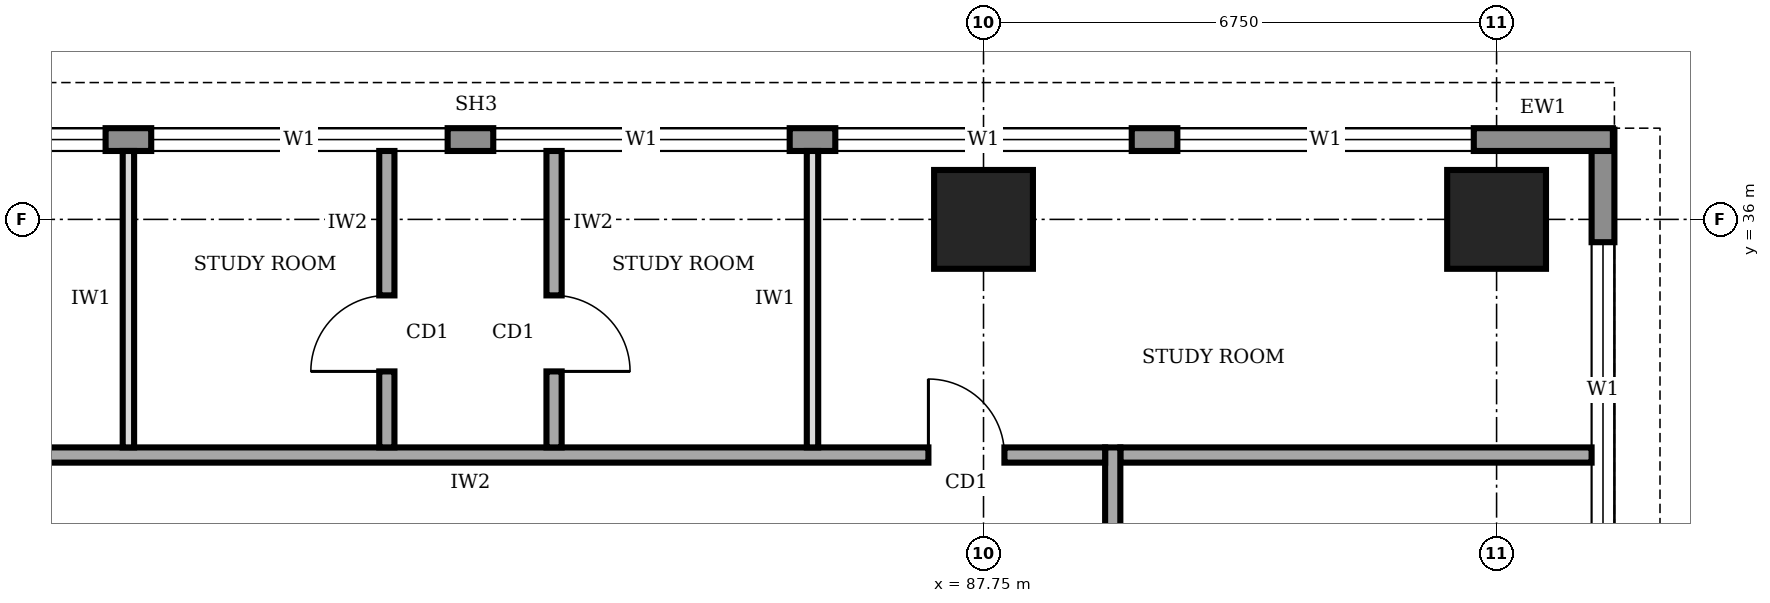
"""IFC4 building model, lengths in metres.
Left out: names, types, materials, properties, quantities, classifications, styles, units other than length and angle.
Written with IfcOpenShell. Run it as: python <this file> out.ifc"""

import sys

from ifc_helpers import new_model, si_unit, direction, frame, frame_2d, origin, origin_2d, place, context, subcontext, project, spatial, rectangle, extrude, element, fill, save


model = new_model("IFC4")
c1 = context("Model", 3, precision=1e-05, world=origin(), true_north=direction((0.0, 1.0)))
c2 = subcontext(c1, "Body", "Model", "MODEL_VIEW")
j1 = project(units=[si_unit("LENGTHUNIT", "METRE"), si_unit("PLANEANGLEUNIT", "RADIAN")], contexts=[c1])
p1 = place(None, origin())
s1 = spatial("IfcSite", under=j1, at=p1, CompositionType="ELEMENT")
p2 = place(p1, origin())
s2 = spatial("IfcBuilding", under=s1, at=p2, CompositionType="ELEMENT")
p3 = place(p2, frame((0.0, 0.0, 225.0)))
s3 = spatial("IfcBuildingStorey", under=s2, at=p3, CompositionType="ELEMENT", Elevation=225.0)
for number, where, z_axis, x_axis in (
    (1, (87.75, 36.0, 0.0), (0.0, 0.0, 1.0), (1.0, 0.0, 0.0)),
    (2, (94.5, 36.0, 0.0), (0.0, 0.0, 1.0), (1.0, 0.0, 0.0)),
):
    element("IfcColumn", number, at=place(p3, frame(where, z_axis=z_axis, x_axis=x_axis)), inside=s3, PredefinedType="COLUMN", context=c2, shape_type="SweptSolid", body=[
        extrude(rectangle(XDim=1.3, YDim=1.3, at=origin_2d()), origin(), (0.0, 0.0, 1.0), 4.0),
    ])
p4 = place(p3, frame((95.9, 3.32, 0.0), z_axis=(0.0, 0.0, 1.0), x_axis=(0.0, 1.0, 0.0)))
e3 = element("IfcWall", 3, at=p4, inside=s3, PredefinedType="STANDARD", context=c2, shape_type="SweptSolid", body=[
    extrude(rectangle(XDim=33.86, YDim=0.3, at=frame_2d((16.93, 0.0))), origin(), (0.0, 0.0, 1.0), 3.75),
])
p5 = place(p4, frame((1.48, 0.0, 0.9)))
e4 = element("IfcOpeningElement", 4, at=p5, cuts=e3, PredefinedType="OPENING", context=c2, shape_type="SweptSolid", body=[
    extrude(rectangle(XDim=3.9, YDim=2.2, at=frame_2d((1.95, 1.1))), frame((0.0, 0.16, 0.0), z_axis=(0.0, -1.0, 0.0), x_axis=(1.0, 0.0, 0.0)), (0.0, 0.0, 1.0), 0.32),
])
p6 = place(p4, frame((5.98, 0.0, 0.9)))
e5 = element("IfcOpeningElement", 5, at=p6, cuts=e3, PredefinedType="OPENING", context=c2, shape_type="SweptSolid", body=[
    extrude(rectangle(XDim=3.9, YDim=2.2, at=frame_2d((1.95, 1.1))), frame((0.0, 0.16, 0.0), z_axis=(0.0, -1.0, 0.0), x_axis=(1.0, 0.0, 0.0)), (0.0, 0.0, 1.0), 0.32),
])
p7 = place(p4, frame((10.48, 0.0, 0.9)))
e6 = element("IfcOpeningElement", 6, at=p7, cuts=e3, PredefinedType="OPENING", context=c2, shape_type="SweptSolid", body=[
    extrude(rectangle(XDim=3.9, YDim=2.2, at=frame_2d((1.95, 1.1))), frame((0.0, 0.16, 0.0), z_axis=(0.0, -1.0, 0.0), x_axis=(1.0, 0.0, 0.0)), (0.0, 0.0, 1.0), 0.32),
])
p8 = place(p4, frame((14.98, 0.0, 0.9)))
e7 = element("IfcOpeningElement", 7, at=p8, cuts=e3, PredefinedType="OPENING", context=c2, shape_type="SweptSolid", body=[
    extrude(rectangle(XDim=3.9, YDim=2.2, at=frame_2d((1.95, 1.1))), frame((0.0, 0.16, 0.0), z_axis=(0.0, -1.0, 0.0), x_axis=(1.0, 0.0, 0.0)), (0.0, 0.0, 1.0), 0.32),
])
p9 = place(p4, frame((19.48, 0.0, 0.9)))
e8 = element("IfcOpeningElement", 8, at=p9, cuts=e3, PredefinedType="OPENING", context=c2, shape_type="SweptSolid", body=[
    extrude(rectangle(XDim=3.9, YDim=2.2, at=frame_2d((1.95, 1.1))), frame((0.0, 0.16, 0.0), z_axis=(0.0, -1.0, 0.0), x_axis=(1.0, 0.0, 0.0)), (0.0, 0.0, 1.0), 0.32),
])
p10 = place(p4, frame((23.98, 0.0, 0.9)))
e9 = element("IfcOpeningElement", 9, at=p10, cuts=e3, PredefinedType="OPENING", context=c2, shape_type="SweptSolid", body=[
    extrude(rectangle(XDim=3.9, YDim=2.2, at=frame_2d((1.95, 1.1))), frame((0.0, 0.16, 0.0), z_axis=(0.0, -1.0, 0.0), x_axis=(1.0, 0.0, 0.0)), (0.0, 0.0, 1.0), 0.32),
])
p11 = place(p4, frame((28.48, 0.0, 0.9)))
e10 = element("IfcOpeningElement", 10, at=p11, cuts=e3, PredefinedType="OPENING", context=c2, shape_type="SweptSolid", body=[
    extrude(rectangle(XDim=3.9, YDim=2.2, at=frame_2d((1.95, 1.1))), frame((0.0, 0.16, 0.0), z_axis=(0.0, -1.0, 0.0), x_axis=(1.0, 0.0, 0.0)), (0.0, 0.0, 1.0), 0.32),
])
p12 = place(p3, frame((96.03, 37.05, 0.0), z_axis=(0.0, 0.0, 1.0), x_axis=(-1.0, 0.0, 0.0)))
e11 = element("IfcWall", 11, at=p12, inside=s3, PredefinedType="STANDARD", context=c2, shape_type="SweptSolid", body=[
    extrude(rectangle(XDim=29.91, YDim=0.3, at=frame_2d((14.955, 0.0))), origin(), (0.0, 0.0, 1.0), 3.75),
])
p13 = place(p12, frame((24.33, 0.0, 0.9)))
e12 = element("IfcOpeningElement", 12, at=p13, cuts=e11, PredefinedType="OPENING", context=c2, shape_type="SweptSolid", body=[
    extrude(rectangle(XDim=3.9, YDim=2.2, at=frame_2d((1.95, 1.1))), frame((0.0, 0.16, 0.0), z_axis=(0.0, -1.0, 0.0), x_axis=(1.0, 0.0, 0.0)), (0.0, 0.0, 1.0), 0.32),
])
p14 = place(p12, frame((19.83, 0.0, 0.9)))
e13 = element("IfcOpeningElement", 13, at=p14, cuts=e11, PredefinedType="OPENING", context=c2, shape_type="SweptSolid", body=[
    extrude(rectangle(XDim=3.9, YDim=2.2, at=frame_2d((1.95, 1.1))), frame((0.0, 0.16, 0.0), z_axis=(0.0, -1.0, 0.0), x_axis=(1.0, 0.0, 0.0)), (0.0, 0.0, 1.0), 0.32),
])
p15 = place(p12, frame((15.33, 0.0, 0.9)))
e14 = element("IfcOpeningElement", 14, at=p15, cuts=e11, PredefinedType="OPENING", context=c2, shape_type="SweptSolid", body=[
    extrude(rectangle(XDim=3.9, YDim=2.2, at=frame_2d((1.95, 1.1))), frame((0.0, 0.16, 0.0), z_axis=(0.0, -1.0, 0.0), x_axis=(1.0, 0.0, 0.0)), (0.0, 0.0, 1.0), 0.32),
])
p16 = place(p12, frame((10.83, 0.0, 0.9)))
e15 = element("IfcOpeningElement", 15, at=p16, cuts=e11, PredefinedType="OPENING", context=c2, shape_type="SweptSolid", body=[
    extrude(rectangle(XDim=3.9, YDim=2.2, at=frame_2d((1.95, 1.1))), frame((0.0, 0.16, 0.0), z_axis=(0.0, -1.0, 0.0), x_axis=(1.0, 0.0, 0.0)), (0.0, 0.0, 1.0), 0.32),
])
p17 = place(p12, frame((6.33, 0.0, 0.9)))
e16 = element("IfcOpeningElement", 16, at=p17, cuts=e11, PredefinedType="OPENING", context=c2, shape_type="SweptSolid", body=[
    extrude(rectangle(XDim=3.9, YDim=2.2, at=frame_2d((1.95, 1.1))), frame((0.0, 0.16, 0.0), z_axis=(0.0, -1.0, 0.0), x_axis=(1.0, 0.0, 0.0)), (0.0, 0.0, 1.0), 0.32),
])
p18 = place(p12, frame((1.83, 0.0, 0.9)))
e17 = element("IfcOpeningElement", 17, at=p18, cuts=e11, PredefinedType="OPENING", context=c2, shape_type="SweptSolid", body=[
    extrude(rectangle(XDim=3.9, YDim=2.2, at=frame_2d((1.95, 1.1))), frame((0.0, 0.16, 0.0), z_axis=(0.0, -1.0, 0.0), x_axis=(1.0, 0.0, 0.0)), (0.0, 0.0, 1.0), 0.32),
])
p19 = place(p3, frame((89.45, 9.2, 0.0), z_axis=(0.0, 0.0, 1.0), x_axis=(0.0, 1.0, 0.0)))
e18 = element("IfcWall", 18, at=p19, inside=s3, PredefinedType="SOLIDWALL", context=c2, shape_type="SweptSolid", body=[
    extrude(rectangle(XDim=23.8, YDim=0.2, at=frame_2d((11.9, 0.0))), origin(), (0.0, 0.0, 1.0), 3.75),
])
p20 = place(p19, frame((1.55, 0.0, 0.0)))
e19 = element("IfcOpeningElement", 19, at=p20, cuts=e18, PredefinedType="OPENING", context=c2, shape_type="SweptSolid", body=[
    extrude(rectangle(XDim=1.0, YDim=2.1, at=frame_2d((0.5, 1.05))), frame((0.0, 0.11, 0.0), z_axis=(0.0, -1.0, 0.0), x_axis=(1.0, 0.0, 0.0)), (0.0, 0.0, 1.0), 0.22),
])
p21 = place(p19, frame((5.75, 0.0, 0.0)))
e20 = element("IfcOpeningElement", 20, at=p21, cuts=e18, PredefinedType="OPENING", context=c2, shape_type="SweptSolid", body=[
    extrude(rectangle(XDim=0.9, YDim=2.1, at=frame_2d((0.45, 1.05))), frame((0.0, 0.11, 0.0), z_axis=(0.0, -1.0, 0.0), x_axis=(1.0, 0.0, 0.0)), (0.0, 0.0, 1.0), 0.22),
])
p22 = place(p19, frame((8.75, 0.0, 0.0)))
e21 = element("IfcOpeningElement", 21, at=p22, cuts=e18, PredefinedType="OPENING", context=c2, shape_type="SweptSolid", body=[
    extrude(rectangle(XDim=0.9, YDim=2.1, at=frame_2d((0.45, 1.05))), frame((0.0, 0.11, 0.0), z_axis=(0.0, -1.0, 0.0), x_axis=(1.0, 0.0, 0.0)), (0.0, 0.0, 1.0), 0.22),
])
p23 = place(p19, frame((13.6, 0.0, 0.0)))
e22 = element("IfcOpeningElement", 22, at=p23, cuts=e18, PredefinedType="OPENING", context=c2, shape_type="SweptSolid", body=[
    extrude(rectangle(XDim=0.9, YDim=2.1, at=frame_2d((0.45, 1.05))), frame((0.0, 0.11, 0.0), z_axis=(0.0, -1.0, 0.0), x_axis=(1.0, 0.0, 0.0)), (0.0, 0.0, 1.0), 0.22),
])
p24 = place(p19, frame((16.3, 0.0, 0.0)))
e23 = element("IfcOpeningElement", 23, at=p24, cuts=e18, PredefinedType="OPENING", context=c2, shape_type="SweptSolid", body=[
    extrude(rectangle(XDim=1.0, YDim=2.1, at=frame_2d((0.5, 1.05))), frame((0.0, 0.11, 0.0), z_axis=(0.0, -1.0, 0.0), x_axis=(1.0, 0.0, 0.0)), (0.0, 0.0, 1.0), 0.22),
])
p25 = place(p19, frame((10.8, 0.0, 0.0)))
e24 = element("IfcOpeningElement", 24, at=p25, cuts=e18, PredefinedType="OPENING", context=c2, shape_type="SweptSolid", body=[
    extrude(rectangle(XDim=1.0, YDim=2.1, at=frame_2d((0.5, 1.05))), frame((0.0, 0.11, 0.0), z_axis=(0.0, -1.0, 0.0), x_axis=(1.0, 0.0, 0.0)), (0.0, 0.0, 1.0), 0.22),
])
p26 = place(p19, frame((20.3, 0.0, 0.0)))
e25 = element("IfcOpeningElement", 25, at=p26, cuts=e18, PredefinedType="OPENING", context=c2, shape_type="SweptSolid", body=[
    extrude(rectangle(XDim=1.0, YDim=2.1, at=frame_2d((0.5, 1.05))), frame((0.0, 0.11, 0.0), z_axis=(0.0, -1.0, 0.0), x_axis=(1.0, 0.0, 0.0)), (0.0, 0.0, 1.0), 0.22),
])
p27 = place(p3, frame((89.35, 32.9, 0.0), z_axis=(0.0, 0.0, 1.0), x_axis=(-1.0, 0.0, 0.0)))
e26 = element("IfcWall", 26, at=p27, inside=s3, PredefinedType="SOLIDWALL", context=c2, shape_type="SweptSolid", body=[
    extrude(rectangle(XDim=16.9, YDim=0.2, at=frame_2d((8.45, 0.0))), origin(), (0.0, 0.0, 1.0), 3.75),
])
p28 = place(p27, frame((14.375, 0.0, 0.0)))
e27 = element("IfcOpeningElement", 27, at=p28, cuts=e26, PredefinedType="OPENING", context=c2, shape_type="SweptSolid", body=[
    extrude(rectangle(XDim=1.0, YDim=2.1, at=frame_2d((0.5, 1.05))), frame((0.0, 0.11, 0.0), z_axis=(0.0, -1.0, 0.0), x_axis=(1.0, 0.0, 0.0)), (0.0, 0.0, 1.0), 0.22),
])
p29 = place(p27, frame((1.325, 0.0, 0.0)))
e28 = element("IfcOpeningElement", 28, at=p29, cuts=e26, PredefinedType="OPENING", context=c2, shape_type="SweptSolid", body=[
    extrude(rectangle(XDim=1.0, YDim=2.1, at=frame_2d((0.5, 1.05))), frame((0.0, 0.11, 0.0), z_axis=(0.0, -1.0, 0.0), x_axis=(1.0, 0.0, 0.0)), (0.0, 0.0, 1.0), 0.22),
])
p30 = place(p3, frame((79.9, 33.0, 0.0), z_axis=(0.0, 0.0, 1.0), x_axis=(0.0, 1.0, 0.0)))
e29 = element("IfcWall", 29, at=p30, inside=s3, PredefinedType="SOLIDWALL", context=c2, shape_type="SweptSolid", body=[
    extrude(rectangle(XDim=3.9, YDim=0.2, at=frame_2d((1.95, 0.0))), origin(), (0.0, 0.0, 1.0), 3.75),
])
p31 = place(p30, frame((1.0, 0.0, 0.0)))
e30 = element("IfcOpeningElement", 30, at=p31, cuts=e29, PredefinedType="OPENING", context=c2, shape_type="SweptSolid", body=[
    extrude(rectangle(XDim=1.0, YDim=2.1, at=frame_2d((0.5, 1.05))), frame((0.0, 0.11, 0.0), z_axis=(0.0, -1.0, 0.0), x_axis=(1.0, 0.0, 0.0)), (0.0, 0.0, 1.0), 0.22),
])
p32 = place(p3, frame((82.1, 36.9, 0.0), z_axis=(0.0, 0.0, 1.0), x_axis=(0.0, -1.0, 0.0)))
e31 = element("IfcWall", 31, at=p32, inside=s3, PredefinedType="SOLIDWALL", context=c2, shape_type="SweptSolid", body=[
    extrude(rectangle(XDim=3.9, YDim=0.2, at=frame_2d((1.95, 0.0))), origin(), (0.0, 0.0, 1.0), 3.75),
])
p33 = place(p32, frame((1.9, 0.0, 0.0)))
e32 = element("IfcOpeningElement", 32, at=p33, cuts=e31, PredefinedType="OPENING", context=c2, shape_type="SweptSolid", body=[
    extrude(rectangle(XDim=1.0, YDim=2.1, at=frame_2d((0.5, 1.05))), frame((0.0, 0.11, 0.0), z_axis=(0.0, -1.0, 0.0), x_axis=(1.0, 0.0, 0.0)), (0.0, 0.0, 1.0), 0.22),
])
p34 = place(p3, frame((89.55, 32.9, 0.0), z_axis=(0.0, 0.0, 1.0), x_axis=(1.0, 0.0, 0.0)))
e33 = element("IfcWall", 33, at=p34, inside=s3, PredefinedType="SOLIDWALL", context=c2, shape_type="SweptSolid", body=[
    extrude(rectangle(XDim=6.2, YDim=0.2, at=frame_2d((3.1, 0.0))), origin(), (0.0, 0.0, 1.0), 3.75),
])
for number, where, z_axis, x_axis in (
    (34, (76.5, 33.0, 0.0), (0.0, 0.0, 1.0), (0.0, 1.0, 0.0)),
    (35, (85.5, 33.0, 0.0), (0.0, 0.0, 1.0), (0.0, 1.0, 0.0)),
):
    element("IfcWall", number, at=place(p3, frame(where, z_axis=z_axis, x_axis=x_axis)), inside=s3, PredefinedType="PARTITIONING", context=c2, shape_type="SweptSolid", body=[
        extrude(rectangle(XDim=3.9, YDim=0.15, at=frame_2d((1.95, 0.0))), origin(), (0.0, 0.0, 1.0), 3.75),
    ])
p35 = place(p11, origin())
e36 = element("IfcWindow", 36, at=p35, inside=s3, PartitioningType="SINGLE_PANEL", PredefinedType="WINDOW", context=c2, shape_type="SweptSolid", body=[
    extrude(rectangle(XDim=3.9, YDim=2.2, at=frame_2d((1.95, 1.1))), frame((0.0, 0.03, 0.0), z_axis=(0.0, -1.0, 0.0), x_axis=(1.0, 0.0, 0.0)), (0.0, 0.0, 1.0), 0.06),
])
fill(e10, e36)
p36 = place(p14, origin())
e37 = element("IfcWindow", 37, at=p36, inside=s3, PartitioningType="SINGLE_PANEL", PredefinedType="WINDOW", context=c2, shape_type="SweptSolid", body=[
    extrude(rectangle(XDim=3.9, YDim=2.2, at=frame_2d((1.95, 1.1))), frame((0.0, 0.03, 0.0), z_axis=(0.0, -1.0, 0.0), x_axis=(1.0, 0.0, 0.0)), (0.0, 0.0, 1.0), 0.06),
])
fill(e13, e37)
p37 = place(p15, origin())
e38 = element("IfcWindow", 38, at=p37, inside=s3, PartitioningType="SINGLE_PANEL", PredefinedType="WINDOW", context=c2, shape_type="SweptSolid", body=[
    extrude(rectangle(XDim=3.9, YDim=2.2, at=frame_2d((1.95, 1.1))), frame((0.0, 0.03, 0.0), z_axis=(0.0, -1.0, 0.0), x_axis=(1.0, 0.0, 0.0)), (0.0, 0.0, 1.0), 0.06),
])
fill(e14, e38)
p38 = place(p16, origin())
e39 = element("IfcWindow", 39, at=p38, inside=s3, PartitioningType="SINGLE_PANEL", PredefinedType="WINDOW", context=c2, shape_type="SweptSolid", body=[
    extrude(rectangle(XDim=3.9, YDim=2.2, at=frame_2d((1.95, 1.1))), frame((0.0, 0.03, 0.0), z_axis=(0.0, -1.0, 0.0), x_axis=(1.0, 0.0, 0.0)), (0.0, 0.0, 1.0), 0.06),
])
fill(e15, e39)
p39 = place(p17, origin())
e40 = element("IfcWindow", 40, at=p39, inside=s3, PartitioningType="SINGLE_PANEL", PredefinedType="WINDOW", context=c2, shape_type="SweptSolid", body=[
    extrude(rectangle(XDim=3.9, YDim=2.2, at=frame_2d((1.95, 1.1))), frame((0.0, 0.03, 0.0), z_axis=(0.0, -1.0, 0.0), x_axis=(1.0, 0.0, 0.0)), (0.0, 0.0, 1.0), 0.06),
])
fill(e16, e40)
p40 = place(p18, origin())
e41 = element("IfcWindow", 41, at=p40, inside=s3, PartitioningType="SINGLE_PANEL", PredefinedType="WINDOW", context=c2, shape_type="SweptSolid", body=[
    extrude(rectangle(XDim=3.9, YDim=2.2, at=frame_2d((1.95, 1.1))), frame((0.0, 0.03, 0.0), z_axis=(0.0, -1.0, 0.0), x_axis=(1.0, 0.0, 0.0)), (0.0, 0.0, 1.0), 0.06),
])
fill(e17, e41)
p41 = place(p29, frame((1.0, 0.0, 0.0), z_axis=(0.0, 0.0, 1.0), x_axis=(-1.0, 0.0, 0.0)))
e42 = element("IfcDoor", 42, at=p41, inside=s3, OperationType="SINGLE_SWING_LEFT", PredefinedType="DOOR", context=c2, shape_type="SweptSolid", body=[
    extrude(rectangle(XDim=1.0, YDim=2.1, at=frame_2d((0.5, 1.05))), frame((0.0, 0.025, 0.0), z_axis=(0.0, -1.0, 0.0), x_axis=(1.0, 0.0, 0.0)), (0.0, 0.0, 1.0), 0.05),
])
fill(e28, e42)
p42 = place(p31, origin())
e43 = element("IfcDoor", 43, at=p42, inside=s3, OperationType="SINGLE_SWING_LEFT", PredefinedType="DOOR", context=c2, shape_type="SweptSolid", body=[
    extrude(rectangle(XDim=1.0, YDim=2.1, at=frame_2d((0.5, 1.05))), frame((0.0, 0.025, 0.0), z_axis=(0.0, -1.0, 0.0), x_axis=(1.0, 0.0, 0.0)), (0.0, 0.0, 1.0), 0.05),
])
fill(e30, e43)
p43 = place(p33, origin())
e44 = element("IfcDoor", 44, at=p43, inside=s3, OperationType="SINGLE_SWING_RIGHT", PredefinedType="DOOR", context=c2, shape_type="SweptSolid", body=[
    extrude(rectangle(XDim=1.0, YDim=2.1, at=frame_2d((0.5, 1.05))), frame((0.0, 0.025, 0.0), z_axis=(0.0, -1.0, 0.0), x_axis=(1.0, 0.0, 0.0)), (0.0, 0.0, 1.0), 0.05),
])
fill(e32, e44)
save(model, sys.argv[1])
